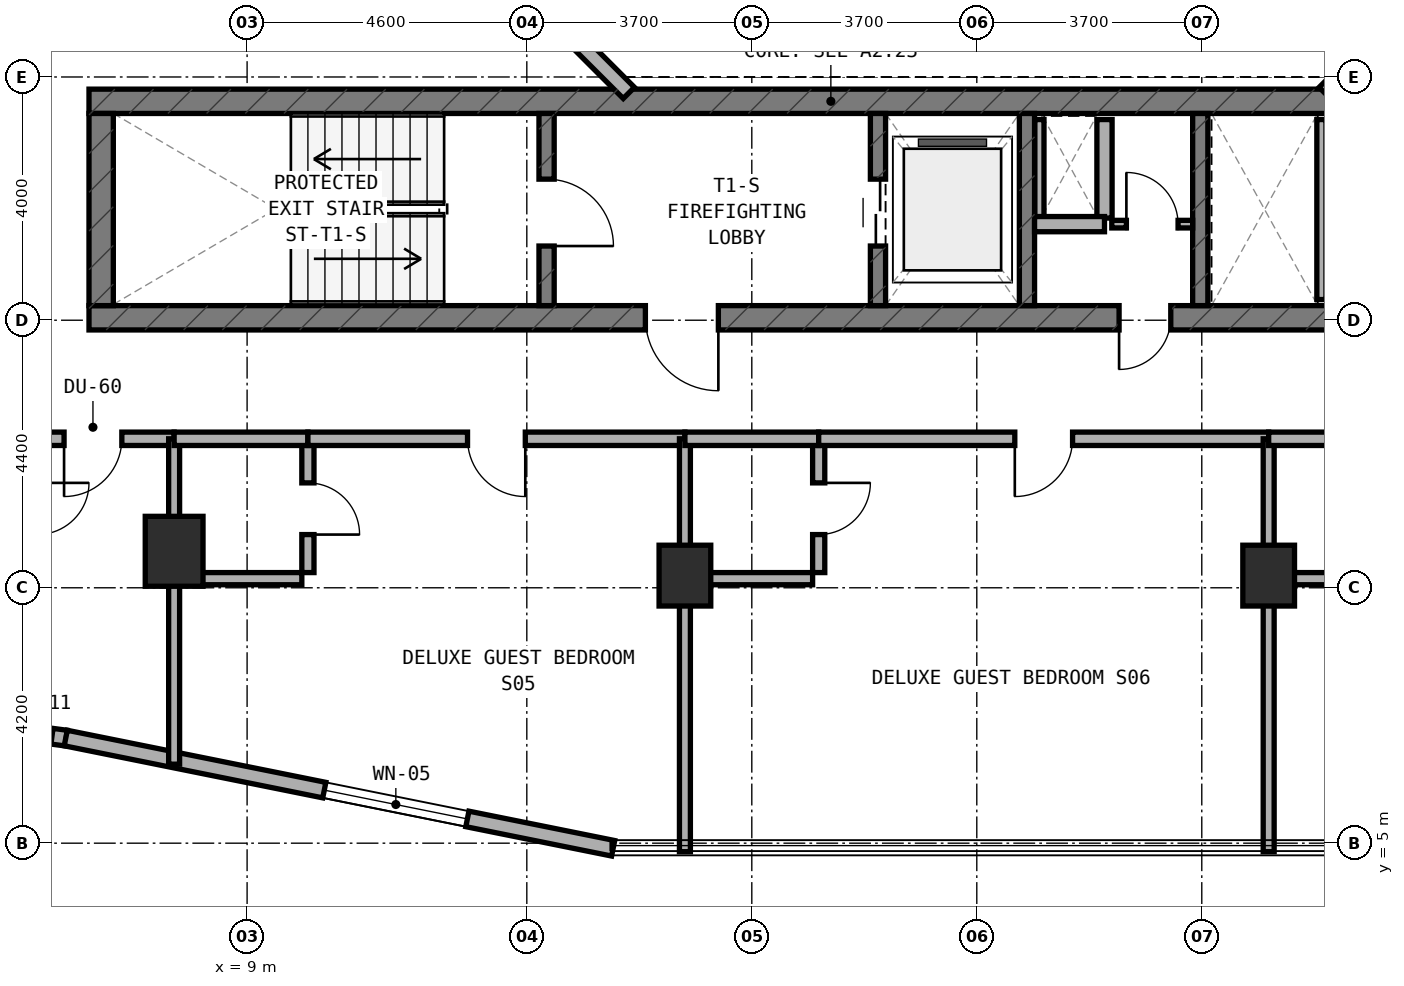
"""IFC4 building model, lengths in metres.
Left out: names, types, materials, properties, quantities, classifications, styles, units other than length and angle.
Written with IfcOpenShell. Run it as: python <this file> out.ifc"""

import sys

from ifc_helpers import new_model, si_unit, direction, frame, frame_2d, origin, origin_2d, place, context, subcontext, project, spatial, rectangle, extrude, element, fill, save


model = new_model("IFC4")
c1 = context("Model", 3, precision=1e-05, world=origin(), true_north=direction((0.0, 1.0)))
c2 = subcontext(c1, "Body", "Model", "MODEL_VIEW")
j1 = project(units=[si_unit("LENGTHUNIT", "METRE"), si_unit("PLANEANGLEUNIT", "RADIAN")], contexts=[c1])
p1 = place(None, origin())
s1 = spatial("IfcSite", under=j1, at=p1, CompositionType="ELEMENT")
p2 = place(p1, origin())
s2 = spatial("IfcBuilding", under=s1, at=p2, CompositionType="ELEMENT")
p3 = place(p2, frame((0.0, 0.0, 98.5)))
s3 = spatial("IfcBuildingStorey", under=s2, at=p3, CompositionType="ELEMENT", Elevation=98.5)
p4 = place(p3, frame((6.4, 13.64, 0.0), z_axis=(0.0, 0.0, 1.0), x_axis=(1.0, 0.0, 0.0)))
e1 = element("IfcWall", 1, at=p4, inside=s3, PredefinedType="SHEAR", context=c2, shape_type="SweptSolid", body=[
    extrude(rectangle(XDim=24.4, YDim=0.4, at=frame_2d((12.2, 0.0))), origin(), (0.0, 0.0, 1.0), 3.5),
])
p5 = place(p4, frame((9.15, 0.0, 0.0)))
e2 = element("IfcOpeningElement", 2, at=p5, cuts=e1, PredefinedType="OPENING", context=c2, shape_type="SweptSolid", body=[
    extrude(rectangle(XDim=1.2, YDim=2.15, at=frame_2d((0.6, 1.075))), frame((0.0, 0.21, 0.0), z_axis=(0.0, -1.0, 0.0), x_axis=(1.0, 0.0, 0.0)), (0.0, 0.0, 1.0), 0.42),
])
p6 = place(p4, frame((16.94, 0.0, 0.0)))
e3 = element("IfcOpeningElement", 3, at=p6, cuts=e1, PredefinedType="OPENING", context=c2, shape_type="SweptSolid", body=[
    extrude(rectangle(XDim=0.85, YDim=2.1, at=frame_2d((0.425, 1.05))), frame((0.0, 0.21, 0.0), z_axis=(0.0, -1.0, 0.0), x_axis=(1.0, 0.0, 0.0)), (0.0, 0.0, 1.0), 0.42),
])
p7 = place(p3, frame((6.4, 17.2, 0.0), z_axis=(0.0, 0.0, 1.0), x_axis=(1.0, 0.0, 0.0)))
e4 = element("IfcWall", 4, at=p7, inside=s3, PredefinedType="SHEAR", context=c2, shape_type="SweptSolid", body=[
    extrude(rectangle(XDim=24.4, YDim=0.4, at=frame_2d((12.2, 0.0))), origin(), (0.0, 0.0, 1.0), 3.5),
])
p8 = place(p3, frame((6.6, 13.84, 0.0), z_axis=(0.0, 0.0, 1.0), x_axis=(0.0, 1.0, 0.0)))
e5 = element("IfcWall", 5, at=p8, inside=s3, PredefinedType="SHEAR", context=c2, shape_type="SweptSolid", body=[
    extrude(rectangle(XDim=3.16, YDim=0.4, at=frame_2d((1.58, 0.0))), origin(), (0.0, 0.0, 1.0), 3.5),
])
p9 = place(p3, frame((13.925, 13.84, 0.0), z_axis=(0.0, 0.0, 1.0), x_axis=(0.0, 1.0, 0.0)))
e6 = element("IfcWall", 6, at=p9, inside=s3, PredefinedType="STANDARD", context=c2, shape_type="SweptSolid", body=[
    extrude(rectangle(XDim=3.16, YDim=0.25, at=frame_2d((1.58, 0.0))), origin(), (0.0, 0.0, 1.0), 3.22),
])
p10 = place(p9, frame((0.98, 0.0, 0.0)))
e7 = element("IfcOpeningElement", 7, at=p10, cuts=e6, PredefinedType="OPENING", context=c2, shape_type="SweptSolid", body=[
    extrude(rectangle(XDim=1.1, YDim=2.15, at=frame_2d((0.55, 1.075))), frame((0.0, 0.135, 0.0), z_axis=(0.0, -1.0, 0.0), x_axis=(1.0, 0.0, 0.0)), (0.0, 0.0, 1.0), 0.27),
])
p11 = place(p3, frame((19.375, 13.84, 0.0), z_axis=(0.0, 0.0, 1.0), x_axis=(0.0, 1.0, 0.0)))
e8 = element("IfcWall", 8, at=p11, inside=s3, PredefinedType="STANDARD", context=c2, shape_type="SweptSolid", body=[
    extrude(rectangle(XDim=3.16, YDim=0.25, at=frame_2d((1.58, 0.0))), origin(), (0.0, 0.0, 1.0), 3.22),
])
p12 = place(p11, frame((0.98, 0.0, 0.0)))
e9 = element("IfcOpeningElement", 9, at=p12, cuts=e8, PredefinedType="OPENING", context=c2, shape_type="SweptSolid", body=[
    extrude(rectangle(XDim=1.1, YDim=2.15, at=frame_2d((0.55, 1.075))), frame((0.0, 0.135, 0.0), z_axis=(0.0, -1.0, 0.0), x_axis=(1.0, 0.0, 0.0)), (0.0, 0.0, 1.0), 0.27),
])
for number, where, z_axis, x_axis in (
    (10, (21.825, 13.84, 0.0), (0.0, 0.0, 1.0), (0.0, 1.0, 0.0)),
    (11, (24.675, 13.84, 0.0), (0.0, 0.0, 1.0), (0.0, 1.0, 0.0)),
):
    element("IfcWall", number, at=place(p3, frame(where, z_axis=z_axis, x_axis=x_axis)), inside=s3, PredefinedType="STANDARD", context=c2, shape_type="SweptSolid", body=[
        extrude(rectangle(XDim=3.16, YDim=0.25, at=frame_2d((1.58, 0.0))), origin(), (0.0, 0.0, 1.0), 3.22),
    ])
for number, where, z_axis, x_axis in (
    (12, (16.2, 9.4, 0.0), (0.0, 0.0, 1.0), (1.0, 0.0, 0.0)),
    (13, (25.8, 9.4, 0.0), (0.0, 0.0, 1.0), (1.0, 0.0, 0.0)),
):
    element("IfcColumn", number, at=place(p3, frame(where, z_axis=z_axis, x_axis=x_axis)), inside=s3, PredefinedType="COLUMN", context=c2, shape_type="SweptSolid", body=[
        extrude(rectangle(XDim=0.85, YDim=1.0, at=origin_2d()), origin(), (0.0, 0.0, 1.0), 3.5),
    ])
p13 = place(p3, frame((7.8, 9.8, 0.0), z_axis=(0.0, 0.0, 1.0), x_axis=(1.0, 0.0, 0.0)))
e14 = element("IfcColumn", 14, at=p13, inside=s3, PredefinedType="COLUMN", context=c2, shape_type="SweptSolid", body=[
    extrude(rectangle(XDim=0.95, YDim=1.15, at=origin_2d()), origin(), (0.0, 0.0, 1.0), 3.5),
])
p14 = place(p3, frame((5.112, 6.848, 0.0), z_axis=(0.0, 0.0, 1.0), x_axis=(0.991487658083, -0.130200706103, 0.0)))
e15 = element("IfcWall", 15, at=p14, inside=s3, PredefinedType="STANDARD", context=c2, shape_type="SweptSolid", body=[
    extrude(rectangle(XDim=0.921, YDim=0.26, at=frame_2d((0.46, 0.0))), origin(), (0.0, 0.0, 1.0), 3.22),
])
p15 = place(p14, frame((0.235, 0.0, 0.85)))
e16 = element("IfcOpeningElement", 16, at=p15, cuts=e15, PredefinedType="OPENING", context=c2, shape_type="SweptSolid", body=[
    extrude(rectangle(XDim=0.45, YDim=1.5, at=frame_2d((0.225, 0.75))), frame((0.0, 0.14, 0.0), z_axis=(0.0, -1.0, 0.0), x_axis=(1.0, 0.0, 0.0)), (0.0, 0.0, 1.0), 0.28),
])
p16 = place(p3, frame((6.018, 6.729, 0.0), z_axis=(0.0, 0.0, 1.0), x_axis=(0.980315963543, -0.197435082048, 0.0)))
e17 = element("IfcWall", 17, at=p16, inside=s3, PredefinedType="STANDARD", context=c2, shape_type="SweptSolid", body=[
    extrude(rectangle(XDim=9.183, YDim=0.26, at=frame_2d((4.591, 0.0))), origin(), (0.0, 0.0, 1.0), 3.22),
])
p17 = place(p16, frame((4.337, 0.0, 0.8)))
e18 = element("IfcOpeningElement", 18, at=p17, cuts=e17, PredefinedType="OPENING", context=c2, shape_type="SweptSolid", body=[
    extrude(rectangle(XDim=2.4, YDim=1.6, at=frame_2d((1.2, 0.8))), frame((0.0, 0.14, 0.0), z_axis=(0.0, -1.0, 0.0), x_axis=(1.0, 0.0, 0.0)), (0.0, 0.0, 1.0), 0.28),
])
for number, where, z_axis, x_axis in (
    (19, (26.722, 17.338, 0.0), (0.0, 0.0, 1.0), (0.707, 0.707, 0.0)),
    (20, (13.444, 19.172, 0.0), (0.0, 0.0, 1.0), (0.707, -0.707, 0.0)),
):
    element("IfcWall", number, at=place(p3, frame(where, z_axis=z_axis, x_axis=x_axis)), inside=s3, PredefinedType="STANDARD", context=c2, shape_type="SweptSolid", body=[
        extrude(rectangle(XDim=2.594, YDim=0.26, at=frame_2d((1.297, 0.0))), origin(), (0.0, 0.0, 1.0), 3.22),
    ])
p18 = place(p3, frame((22.03, 15.28, 0.0), z_axis=(0.0, 0.0, 1.0), x_axis=(0.0, 1.0, 0.0)))
e21 = element("IfcWall", 21, at=p18, inside=s3, PredefinedType="PARTITIONING", context=c2, shape_type="SweptSolid", body=[
    extrude(rectangle(XDim=1.62, YDim=0.15, at=frame_2d((0.81, 0.0))), origin(), (0.0, 0.0, 1.0), 3.22),
])
p19 = place(p3, frame((23.1, 15.28, 0.0), z_axis=(0.0, 0.0, 1.0), x_axis=(0.0, 1.0, 0.0)))
e22 = element("IfcWall", 22, at=p19, inside=s3, PredefinedType="SOLIDWALL", context=c2, shape_type="SweptSolid", body=[
    extrude(rectangle(XDim=1.62, YDim=0.25, at=frame_2d((0.81, 0.0))), origin(), (0.0, 0.0, 1.0), 3.22),
])
p20 = place(p3, frame((21.95, 15.18, 0.0), z_axis=(0.0, 0.0, 1.0), x_axis=(1.0, 0.0, 0.0)))
e23 = element("IfcWall", 23, at=p20, inside=s3, PredefinedType="SOLIDWALL", context=c2, shape_type="SweptSolid", body=[
    extrude(rectangle(XDim=1.15, YDim=0.25, at=frame_2d((0.575, 0.0))), origin(), (0.0, 0.0, 1.0), 3.22),
])
p21 = place(p3, frame((23.22, 15.18, 0.0), z_axis=(0.0, 0.0, 1.0), x_axis=(1.0, 0.0, 0.0)))
e24 = element("IfcWall", 24, at=p21, inside=s3, PredefinedType="PARTITIONING", context=c2, shape_type="SweptSolid", body=[
    extrude(rectangle(XDim=1.33, YDim=0.125, at=frame_2d((0.665, 0.0))), origin(), (0.0, 0.0, 1.0), 3.22),
])
p22 = place(p21, frame((0.24, 0.0, 0.0)))
e25 = element("IfcOpeningElement", 25, at=p22, cuts=e24, PredefinedType="OPENING", context=c2, shape_type="SweptSolid", body=[
    extrude(rectangle(XDim=0.85, YDim=2.1, at=frame_2d((0.425, 1.05))), frame((0.0, 0.073, 0.0), z_axis=(0.0, -1.0, 0.0), x_axis=(1.0, 0.0, 0.0)), (0.0, 0.0, 1.0), 0.145),
])
p23 = place(p3, frame((26.667, 13.94, 0.0), z_axis=(0.0, 0.0, 1.0), x_axis=(0.0, 1.0, 0.0)))
e26 = element("IfcWall", 26, at=p23, inside=s3, PredefinedType="PARTITIONING", context=c2, shape_type="SweptSolid", body=[
    extrude(rectangle(XDim=2.96, YDim=0.15, at=frame_2d((1.48, 0.0))), origin(), (0.0, 0.0, 1.0), 3.22),
])
p24 = place(p3, frame((5.55, 11.65, 0.0), z_axis=(0.0, 0.0, 1.0), x_axis=(1.0, 0.0, 0.0)))
e27 = element("IfcWall", 27, at=p24, inside=s3, PredefinedType="SOLIDWALL", context=c2, shape_type="SweptSolid", body=[
    extrude(rectangle(XDim=2.25, YDim=0.22, at=frame_2d((1.125, 0.0))), origin(), (0.0, 0.0, 1.0), 2.595),
])
p25 = place(p24, frame((0.44, 0.0, 0.0)))
e28 = element("IfcOpeningElement", 28, at=p25, cuts=e27, PredefinedType="OPENING", context=c2, shape_type="SweptSolid", body=[
    extrude(rectangle(XDim=0.95, YDim=2.1, at=frame_2d((0.475, 1.05))), frame((0.0, 0.12, 0.0), z_axis=(0.0, -1.0, 0.0), x_axis=(1.0, 0.0, 0.0)), (0.0, 0.0, 1.0), 0.24),
])
p26 = place(p3, frame((7.8, 6.299, 0.0), z_axis=(0.0, 0.0, 1.0), x_axis=(0.0, 1.0, 0.0)))
e29 = element("IfcWall", 29, at=p26, inside=s3, PredefinedType="SOLIDWALL", context=c2, shape_type="SweptSolid", body=[
    extrude(rectangle(XDim=5.351, YDim=0.18, at=frame_2d((2.675, 0.0))), origin(), (0.0, 0.0, 1.0), 2.595),
])
p27 = place(p3, frame((10.0, 9.45, 0.0), z_axis=(0.0, 0.0, 1.0), x_axis=(0.0, 1.0, 0.0)))
e30 = element("IfcWall", 30, at=p27, inside=s3, PredefinedType="PLUMBINGWALL", context=c2, shape_type="SweptSolid", body=[
    extrude(rectangle(XDim=2.1, YDim=0.2, at=frame_2d((1.05, 0.0))), origin(), (0.0, 0.0, 1.0), 2.835),
])
p28 = place(p27, frame((0.625, 0.0, 0.0)))
e31 = element("IfcOpeningElement", 31, at=p28, cuts=e30, PredefinedType="OPENING", context=c2, shape_type="SweptSolid", body=[
    extrude(rectangle(XDim=0.85, YDim=2.1, at=frame_2d((0.425, 1.05))), frame((0.0, 0.11, 0.0), z_axis=(0.0, -1.0, 0.0), x_axis=(1.0, 0.0, 0.0)), (0.0, 0.0, 1.0), 0.22),
])
p29 = place(p3, frame((7.9, 9.35, 0.0), z_axis=(0.0, 0.0, 1.0), x_axis=(1.0, 0.0, 0.0)))
e32 = element("IfcWall", 32, at=p29, inside=s3, PredefinedType="PLUMBINGWALL", context=c2, shape_type="SweptSolid", body=[
    extrude(rectangle(XDim=2.0, YDim=0.2, at=frame_2d((1.0, 0.0))), origin(), (0.0, 0.0, 1.0), 3.22),
])
p30 = place(p3, frame((7.8, 11.65, 0.0), z_axis=(0.0, 0.0, 1.0), x_axis=(1.0, 0.0, 0.0)))
e33 = element("IfcWall", 33, at=p30, inside=s3, PredefinedType="SOLIDWALL", context=c2, shape_type="SweptSolid", body=[
    extrude(rectangle(XDim=2.2, YDim=0.22, at=frame_2d((1.1, 0.0))), origin(), (0.0, 0.0, 1.0), 2.595),
])
p31 = place(p3, frame((10.0, 11.65, 0.0), z_axis=(0.0, 0.0, 1.0), x_axis=(1.0, 0.0, 0.0)))
e34 = element("IfcWall", 34, at=p31, inside=s3, PredefinedType="SOLIDWALL", context=c2, shape_type="SweptSolid", body=[
    extrude(rectangle(XDim=6.2, YDim=0.22, at=frame_2d((3.1, 0.0))), origin(), (0.0, 0.0, 1.0), 2.595),
])
p32 = place(p31, frame((2.625, 0.0, 0.0)))
e35 = element("IfcOpeningElement", 35, at=p32, cuts=e34, PredefinedType="OPENING", context=c2, shape_type="SweptSolid", body=[
    extrude(rectangle(XDim=0.95, YDim=2.1, at=frame_2d((0.475, 1.05))), frame((0.0, 0.12, 0.0), z_axis=(0.0, -1.0, 0.0), x_axis=(1.0, 0.0, 0.0)), (0.0, 0.0, 1.0), 0.24),
])
p33 = place(p3, frame((16.2, 4.86, 0.0), z_axis=(0.0, 0.0, 1.0), x_axis=(0.0, 1.0, 0.0)))
e36 = element("IfcWall", 36, at=p33, inside=s3, PredefinedType="SOLIDWALL", context=c2, shape_type="SweptSolid", body=[
    extrude(rectangle(XDim=6.79, YDim=0.18, at=frame_2d((3.395, 0.0))), origin(), (0.0, 0.0, 1.0), 2.595),
])
p34 = place(p3, frame((18.4, 9.45, 0.0), z_axis=(0.0, 0.0, 1.0), x_axis=(0.0, 1.0, 0.0)))
e37 = element("IfcWall", 37, at=p34, inside=s3, PredefinedType="PLUMBINGWALL", context=c2, shape_type="SweptSolid", body=[
    extrude(rectangle(XDim=2.1, YDim=0.2, at=frame_2d((1.05, 0.0))), origin(), (0.0, 0.0, 1.0), 2.835),
])
p35 = place(p34, frame((0.625, 0.0, 0.0)))
e38 = element("IfcOpeningElement", 38, at=p35, cuts=e37, PredefinedType="OPENING", context=c2, shape_type="SweptSolid", body=[
    extrude(rectangle(XDim=0.85, YDim=2.1, at=frame_2d((0.425, 1.05))), frame((0.0, 0.11, 0.0), z_axis=(0.0, -1.0, 0.0), x_axis=(1.0, 0.0, 0.0)), (0.0, 0.0, 1.0), 0.22),
])
p36 = place(p3, frame((16.3, 9.35, 0.0), z_axis=(0.0, 0.0, 1.0), x_axis=(1.0, 0.0, 0.0)))
e39 = element("IfcWall", 39, at=p36, inside=s3, PredefinedType="PLUMBINGWALL", context=c2, shape_type="SweptSolid", body=[
    extrude(rectangle(XDim=2.0, YDim=0.2, at=frame_2d((1.0, 0.0))), origin(), (0.0, 0.0, 1.0), 2.835),
])
p37 = place(p3, frame((16.2, 11.65, 0.0), z_axis=(0.0, 0.0, 1.0), x_axis=(1.0, 0.0, 0.0)))
e40 = element("IfcWall", 40, at=p37, inside=s3, PredefinedType="SOLIDWALL", context=c2, shape_type="SweptSolid", body=[
    extrude(rectangle(XDim=2.2, YDim=0.22, at=frame_2d((1.1, 0.0))), origin(), (0.0, 0.0, 1.0), 2.595),
])
p38 = place(p3, frame((18.4, 11.65, 0.0), z_axis=(0.0, 0.0, 1.0), x_axis=(1.0, 0.0, 0.0)))
e41 = element("IfcWall", 41, at=p38, inside=s3, PredefinedType="SOLIDWALL", context=c2, shape_type="SweptSolid", body=[
    extrude(rectangle(XDim=7.4, YDim=0.22, at=frame_2d((3.7, 0.0))), origin(), (0.0, 0.0, 1.0), 2.595),
])
p39 = place(p38, frame((3.225, 0.0, 0.0)))
e42 = element("IfcOpeningElement", 42, at=p39, cuts=e41, PredefinedType="OPENING", context=c2, shape_type="SweptSolid", body=[
    extrude(rectangle(XDim=0.95, YDim=2.1, at=frame_2d((0.475, 1.05))), frame((0.0, 0.12, 0.0), z_axis=(0.0, -1.0, 0.0), x_axis=(1.0, 0.0, 0.0)), (0.0, 0.0, 1.0), 0.24),
])
p40 = place(p3, frame((25.8, 4.86, 0.0), z_axis=(0.0, 0.0, 1.0), x_axis=(0.0, 1.0, 0.0)))
e43 = element("IfcWall", 43, at=p40, inside=s3, PredefinedType="SOLIDWALL", context=c2, shape_type="SweptSolid", body=[
    extrude(rectangle(XDim=6.79, YDim=0.18, at=frame_2d((3.395, 0.0))), origin(), (0.0, 0.0, 1.0), 2.595),
])
p41 = place(p3, frame((25.9, 9.35, 0.0), z_axis=(0.0, 0.0, 1.0), x_axis=(1.0, 0.0, 0.0)))
e44 = element("IfcWall", 44, at=p41, inside=s3, PredefinedType="PLUMBINGWALL", context=c2, shape_type="SweptSolid", body=[
    extrude(rectangle(XDim=2.0, YDim=0.2, at=frame_2d((1.0, 0.0))), origin(), (0.0, 0.0, 1.0), 2.835),
])
p42 = place(p3, frame((25.8, 11.65, 0.0), z_axis=(0.0, 0.0, 1.0), x_axis=(1.0, 0.0, 0.0)))
e45 = element("IfcWall", 45, at=p42, inside=s3, PredefinedType="SOLIDWALL", context=c2, shape_type="SweptSolid", body=[
    extrude(rectangle(XDim=2.2, YDim=0.22, at=frame_2d((1.1, 0.0))), origin(), (0.0, 0.0, 1.0), 2.595),
])
p43 = place(p17, origin())
e46 = element("IfcWindow", 46, at=p43, inside=s3, PartitioningType="SINGLE_PANEL", PredefinedType="WINDOW", context=c2, shape_type="SweptSolid", body=[
    extrude(rectangle(XDim=2.4, YDim=1.6, at=frame_2d((1.2, 0.8))), frame((0.0, 0.03, 0.0), z_axis=(0.0, -1.0, 0.0), x_axis=(1.0, 0.0, 0.0)), (0.0, 0.0, 1.0), 0.06),
])
fill(e18, e46)
p44 = place(p10, frame((1.1, 0.0, 0.0), z_axis=(0.0, 0.0, 1.0), x_axis=(-1.0, 0.0, 0.0)))
e47 = element("IfcDoor", 47, at=p44, inside=s3, OperationType="SINGLE_SWING_RIGHT", PredefinedType="DOOR", context=c2, shape_type="SweptSolid", body=[
    extrude(rectangle(XDim=1.1, YDim=2.15, at=frame_2d((0.55, 1.075))), frame((0.0, 0.025, 0.0), z_axis=(0.0, -1.0, 0.0), x_axis=(1.0, 0.0, 0.0)), (0.0, 0.0, 1.0), 0.05),
])
fill(e7, e47)
p45 = place(p5, frame((1.2, 0.0, 0.0), z_axis=(0.0, 0.0, 1.0), x_axis=(-1.0, 0.0, 0.0)))
e48 = element("IfcDoor", 48, at=p45, inside=s3, OperationType="SINGLE_SWING_LEFT", PredefinedType="DOOR", context=c2, shape_type="SweptSolid", body=[
    extrude(rectangle(XDim=1.2, YDim=2.15, at=frame_2d((0.6, 1.075))), frame((0.0, 0.025, 0.0), z_axis=(0.0, -1.0, 0.0), x_axis=(1.0, 0.0, 0.0)), (0.0, 0.0, 1.0), 0.05),
])
fill(e2, e48)
p46 = place(p12, origin())
e49 = element("IfcDoor", 49, at=p46, inside=s3, OperationType="DOUBLE_DOOR_SLIDING", PredefinedType="DOOR", context=c2, shape_type="SweptSolid", body=[
    extrude(rectangle(XDim=1.1, YDim=2.15, at=frame_2d((0.55, 1.075))), frame((0.0, 0.025, 0.0), z_axis=(0.0, -1.0, 0.0), x_axis=(1.0, 0.0, 0.0)), (0.0, 0.0, 1.0), 0.05),
])
fill(e9, e49)
p47 = place(p6, frame((0.85, 0.0, 0.0), z_axis=(0.0, 0.0, 1.0), x_axis=(-1.0, 0.0, 0.0)))
e50 = element("IfcDoor", 50, at=p47, inside=s3, OperationType="SINGLE_SWING_RIGHT", PredefinedType="DOOR", context=c2, shape_type="SweptSolid", body=[
    extrude(rectangle(XDim=0.85, YDim=2.1, at=frame_2d((0.425, 1.05))), frame((0.0, 0.025, 0.0), z_axis=(0.0, -1.0, 0.0), x_axis=(1.0, 0.0, 0.0)), (0.0, 0.0, 1.0), 0.05),
])
fill(e3, e50)
p48 = place(p22, origin())
e51 = element("IfcDoor", 51, at=p48, inside=s3, OperationType="SINGLE_SWING_LEFT", PredefinedType="DOOR", context=c2, shape_type="SweptSolid", body=[
    extrude(rectangle(XDim=0.85, YDim=2.1, at=frame_2d((0.425, 1.05))), frame((0.0, 0.025, 0.0), z_axis=(0.0, -1.0, 0.0), x_axis=(1.0, 0.0, 0.0)), (0.0, 0.0, 1.0), 0.05),
])
fill(e25, e51)
p49 = place(p25, frame((0.95, 0.0, 0.0), z_axis=(0.0, 0.0, 1.0), x_axis=(-1.0, 0.0, 0.0)))
e52 = element("IfcDoor", 52, at=p49, inside=s3, OperationType="SINGLE_SWING_RIGHT", PredefinedType="DOOR", context=c2, shape_type="SweptSolid", body=[
    extrude(rectangle(XDim=0.95, YDim=2.1, at=frame_2d((0.475, 1.05))), frame((0.0, 0.025, 0.0), z_axis=(0.0, -1.0, 0.0), x_axis=(1.0, 0.0, 0.0)), (0.0, 0.0, 1.0), 0.05),
])
fill(e28, e52)
p50 = place(p28, frame((0.85, 0.0, 0.0), z_axis=(0.0, 0.0, 1.0), x_axis=(-1.0, 0.0, 0.0)))
e53 = element("IfcDoor", 53, at=p50, inside=s3, OperationType="SINGLE_SWING_RIGHT", PredefinedType="DOOR", context=c2, shape_type="SweptSolid", body=[
    extrude(rectangle(XDim=0.85, YDim=2.1, at=frame_2d((0.425, 1.05))), frame((0.0, 0.025, 0.0), z_axis=(0.0, -1.0, 0.0), x_axis=(1.0, 0.0, 0.0)), (0.0, 0.0, 1.0), 0.05),
])
fill(e31, e53)
p51 = place(p32, frame((0.95, 0.0, 0.0), z_axis=(0.0, 0.0, 1.0), x_axis=(-1.0, 0.0, 0.0)))
e54 = element("IfcDoor", 54, at=p51, inside=s3, OperationType="SINGLE_SWING_LEFT", PredefinedType="DOOR", context=c2, shape_type="SweptSolid", body=[
    extrude(rectangle(XDim=0.95, YDim=2.1, at=frame_2d((0.475, 1.05))), frame((0.0, 0.025, 0.0), z_axis=(0.0, -1.0, 0.0), x_axis=(1.0, 0.0, 0.0)), (0.0, 0.0, 1.0), 0.05),
])
fill(e35, e54)
p52 = place(p35, frame((0.85, 0.0, 0.0), z_axis=(0.0, 0.0, 1.0), x_axis=(-1.0, 0.0, 0.0)))
e55 = element("IfcDoor", 55, at=p52, inside=s3, OperationType="SINGLE_SWING_LEFT", PredefinedType="DOOR", context=c2, shape_type="SweptSolid", body=[
    extrude(rectangle(XDim=0.85, YDim=2.1, at=frame_2d((0.425, 1.05))), frame((0.0, 0.025, 0.0), z_axis=(0.0, -1.0, 0.0), x_axis=(1.0, 0.0, 0.0)), (0.0, 0.0, 1.0), 0.05),
])
fill(e38, e55)
p53 = place(p39, frame((0.95, 0.0, 0.0), z_axis=(0.0, 0.0, 1.0), x_axis=(-1.0, 0.0, 0.0)))
e56 = element("IfcDoor", 56, at=p53, inside=s3, OperationType="SINGLE_SWING_RIGHT", PredefinedType="DOOR", context=c2, shape_type="SweptSolid", body=[
    extrude(rectangle(XDim=0.95, YDim=2.1, at=frame_2d((0.475, 1.05))), frame((0.0, 0.025, 0.0), z_axis=(0.0, -1.0, 0.0), x_axis=(1.0, 0.0, 0.0)), (0.0, 0.0, 1.0), 0.05),
])
fill(e42, e56)
save(model, sys.argv[1])
